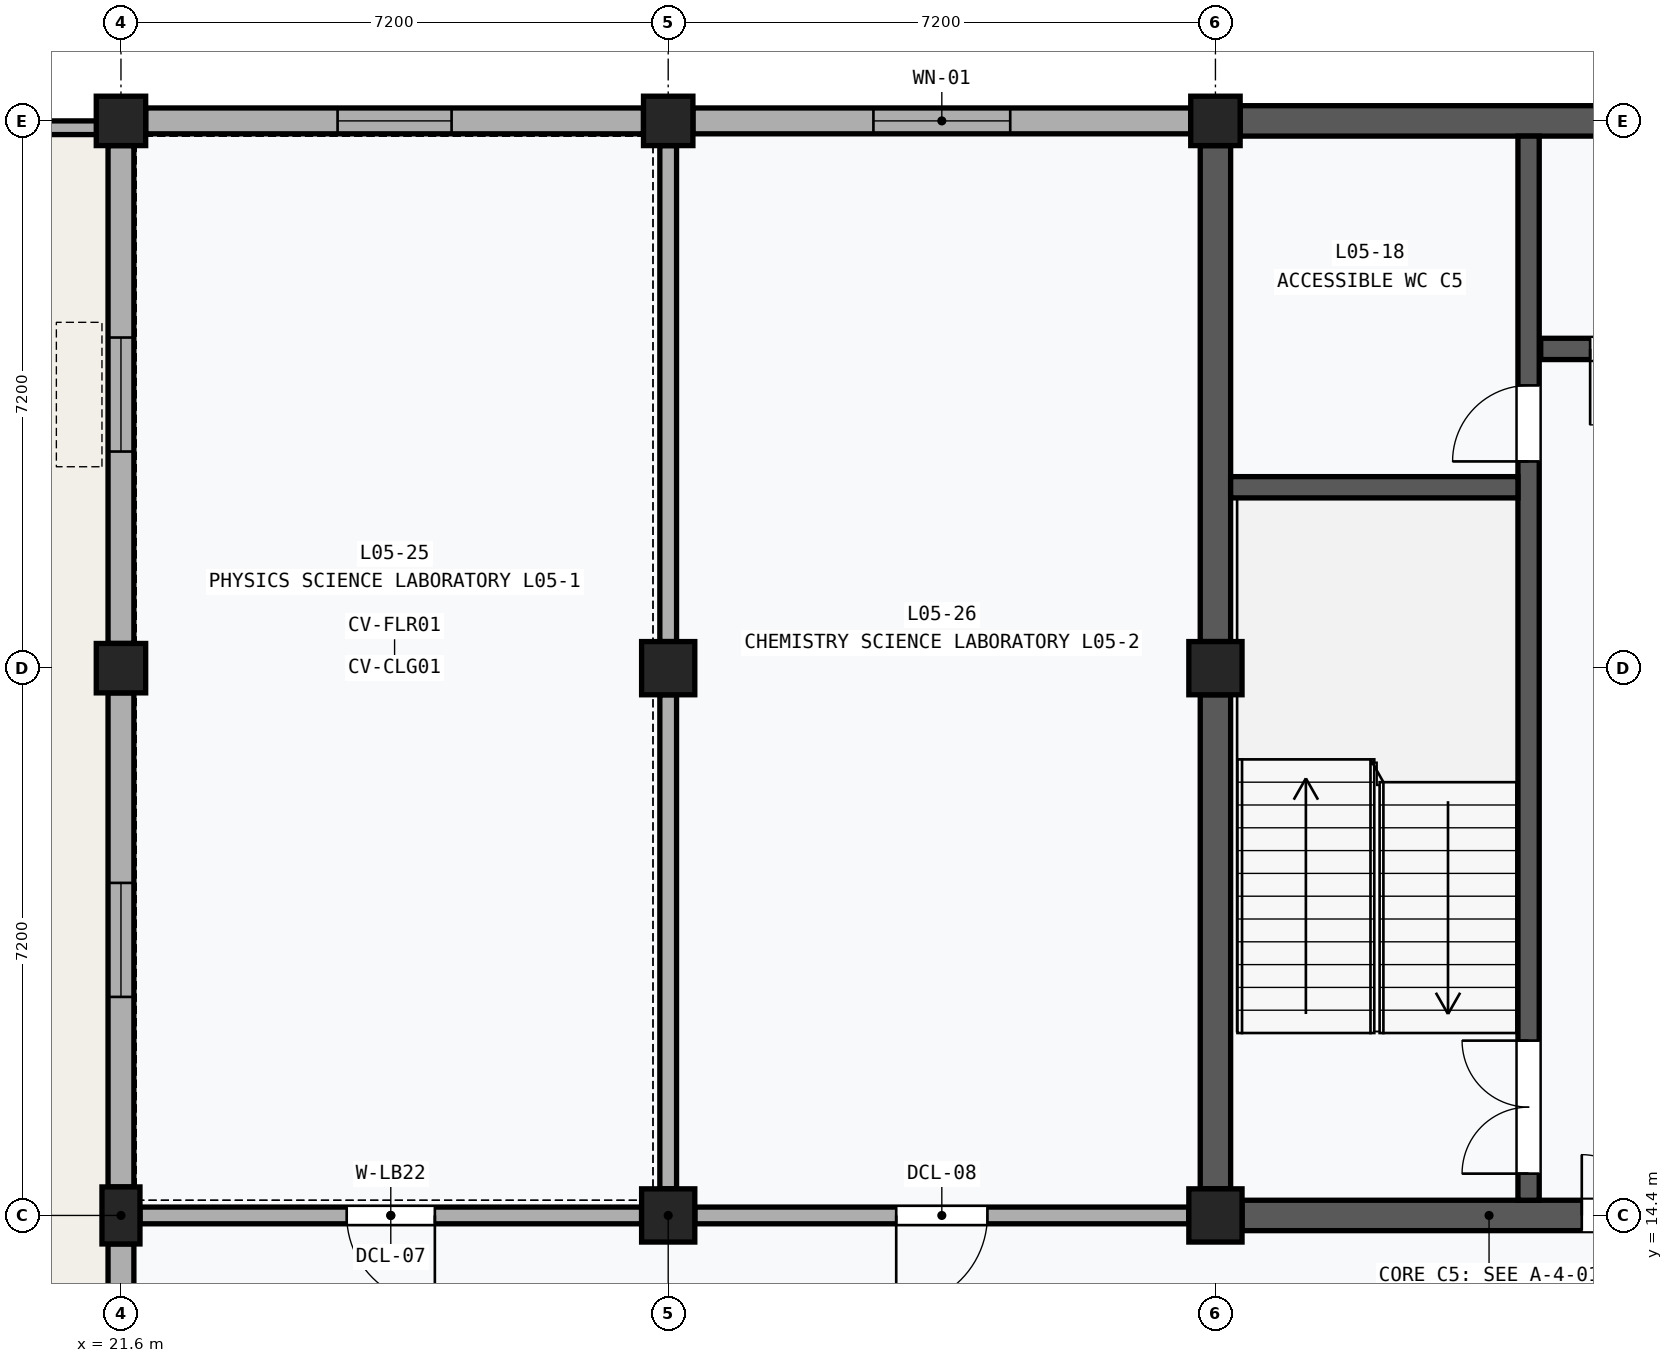
"""IFC4 building model, lengths in metres.
Left out: names, types, materials, properties, quantities, classifications, styles, units other than length and angle.
Written with IfcOpenShell. Run it as: python <this file> out.ifc"""

import sys

from ifc_helpers import new_model, si_unit, direction, frame, frame_2d, origin, origin_2d, place, context, subcontext, project, spatial, rectangle, extrude, element, fill, save


model = new_model("IFC4")
c1 = context("Model", 3, precision=1e-05, world=origin(), true_north=direction((0.0, 1.0)))
c2 = subcontext(c1, "Body", "Model", "MODEL_VIEW")
j1 = project(units=[si_unit("LENGTHUNIT", "METRE"), si_unit("PLANEANGLEUNIT", "RADIAN")], contexts=[c1])
p1 = place(None, origin())
s1 = spatial("IfcSite", under=j1, at=p1, CompositionType="ELEMENT")
p2 = place(p1, origin())
s2 = spatial("IfcBuilding", under=s1, at=p2, CompositionType="ELEMENT")
p3 = place(p2, frame((0.0, 0.0, 22.6)))
s3 = spatial("IfcBuildingStorey", under=s2, at=p3, CompositionType="ELEMENT", Elevation=22.6)
p4 = place(p3, frame((21.6, 14.4, 0.0), z_axis=(0.0, 0.0, 1.0), x_axis=(1.0, 0.0, 0.0)))
e1 = element("IfcColumn", 1, at=p4, inside=s3, PredefinedType="PILASTER", context=c2, shape_type="SweptSolid", body=[
    extrude(rectangle(XDim=0.5, YDim=0.75, at=origin_2d()), origin(), (0.0, 0.0, 1.0), 4.0),
])
for number, where, z_axis, x_axis in (
    (2, (21.6, 21.6, 0.0), (0.0, 0.0, 1.0), (1.0, 0.0, 0.0)),
    (3, (21.6, 28.8, 0.0), (0.0, 0.0, 1.0), (1.0, 0.0, 0.0)),
):
    element("IfcColumn", number, at=place(p3, frame(where, z_axis=z_axis, x_axis=x_axis)), inside=s3, PredefinedType="COLUMN", context=c2, shape_type="SweptSolid", body=[
        extrude(rectangle(XDim=0.65, YDim=0.65, at=origin_2d()), origin(), (0.0, 0.0, 1.0), 4.0),
    ])
for number, where, z_axis, x_axis in (
    (4, (28.8, 14.4, 0.0), (0.0, 0.0, 1.0), (1.0, 0.0, 0.0)),
    (5, (28.8, 21.6, 0.0), (0.0, 0.0, 1.0), (1.0, 0.0, 0.0)),
):
    element("IfcColumn", number, at=place(p3, frame(where, z_axis=z_axis, x_axis=x_axis)), inside=s3, PredefinedType="COLUMN", context=c2, shape_type="SweptSolid", body=[
        extrude(rectangle(XDim=0.7, YDim=0.7, at=origin_2d()), origin(), (0.0, 0.0, 1.0), 4.0),
    ])
p5 = place(p3, frame((28.8, 28.8, 0.0), z_axis=(0.0, 0.0, 1.0), x_axis=(1.0, 0.0, 0.0)))
e6 = element("IfcColumn", 6, at=p5, inside=s3, PredefinedType="COLUMN", context=c2, shape_type="SweptSolid", body=[
    extrude(rectangle(XDim=0.65, YDim=0.65, at=origin_2d()), origin(), (0.0, 0.0, 1.0), 4.0),
])
for number, where, z_axis, x_axis in (
    (7, (36.0, 14.4, 0.0), (0.0, 0.0, 1.0), (1.0, 0.0, 0.0)),
    (8, (36.0, 21.6, 0.0), (0.0, 0.0, 1.0), (1.0, 0.0, 0.0)),
):
    element("IfcColumn", number, at=place(p3, frame(where, z_axis=z_axis, x_axis=x_axis)), inside=s3, PredefinedType="COLUMN", context=c2, shape_type="SweptSolid", body=[
        extrude(rectangle(XDim=0.7, YDim=0.7, at=origin_2d()), origin(), (0.0, 0.0, 1.0), 4.0),
    ])
p6 = place(p3, frame((36.0, 28.8, 0.0), z_axis=(0.0, 0.0, 1.0), x_axis=(1.0, 0.0, 0.0)))
e9 = element("IfcColumn", 9, at=p6, inside=s3, PredefinedType="COLUMN", context=c2, shape_type="SweptSolid", body=[
    extrude(rectangle(XDim=0.65, YDim=0.65, at=origin_2d()), origin(), (0.0, 0.0, 1.0), 4.0),
])
p7 = place(p3, frame((21.6, 7.525, 0.0), z_axis=(0.0, 0.0, 1.0), x_axis=(0.0, 1.0, 0.0)))
e10 = element("IfcWall", 10, at=p7, inside=s3, PredefinedType="SOLIDWALL", context=c2, shape_type="SweptSolid", body=[
    extrude(rectangle(XDim=6.5, YDim=0.34, at=frame_2d((3.25, 0.0))), origin(), (0.0, 0.0, 1.0), 3.12),
])
p8 = place(p7, frame((2.5, 0.0, 1.1)))
e11 = element("IfcOpeningElement", 11, at=p8, cuts=e10, PredefinedType="OPENING", context=c2, shape_type="SweptSolid", body=[
    extrude(rectangle(XDim=1.5, YDim=1.35, at=frame_2d((0.75, 0.675))), frame((0.0, 0.182, 0.0), z_axis=(0.0, -1.0, 0.0), x_axis=(1.0, 0.0, 0.0)), (0.0, 0.0, 1.0), 0.364),
])
p9 = place(p3, frame((21.6, 14.775, 0.0), z_axis=(0.0, 0.0, 1.0), x_axis=(0.0, 1.0, 0.0)))
e12 = element("IfcWall", 12, at=p9, inside=s3, PredefinedType="SOLIDWALL", context=c2, shape_type="SweptSolid", body=[
    extrude(rectangle(XDim=6.5, YDim=0.34, at=frame_2d((3.25, 0.0))), origin(), (0.0, 0.0, 1.0), 3.12),
])
p10 = place(p9, frame((2.5, 0.0, 1.1)))
e13 = element("IfcOpeningElement", 13, at=p10, cuts=e12, PredefinedType="OPENING", context=c2, shape_type="SweptSolid", body=[
    extrude(rectangle(XDim=1.5, YDim=1.35, at=frame_2d((0.75, 0.675))), frame((0.0, 0.182, 0.0), z_axis=(0.0, -1.0, 0.0), x_axis=(1.0, 0.0, 0.0)), (0.0, 0.0, 1.0), 0.364),
])
p11 = place(p3, frame((21.925, 28.8, 0.0), z_axis=(0.0, 0.0, 1.0), x_axis=(1.0, 0.0, 0.0)))
e14 = element("IfcWall", 14, at=p11, inside=s3, PredefinedType="SOLIDWALL", context=c2, shape_type="SweptSolid", body=[
    extrude(rectangle(XDim=6.55, YDim=0.34, at=frame_2d((3.275, 0.0))), origin(), (0.0, 0.0, 1.0), 3.12),
])
p12 = place(p11, frame((2.525, 0.0, 1.1)))
e15 = element("IfcOpeningElement", 15, at=p12, cuts=e14, PredefinedType="OPENING", context=c2, shape_type="SweptSolid", body=[
    extrude(rectangle(XDim=1.5, YDim=1.35, at=frame_2d((0.75, 0.675))), frame((0.0, 0.182, 0.0), z_axis=(0.0, -1.0, 0.0), x_axis=(1.0, 0.0, 0.0)), (0.0, 0.0, 1.0), 0.364),
])
p13 = place(p3, frame((21.6, 21.925, 0.0), z_axis=(0.0, 0.0, 1.0), x_axis=(0.0, 1.0, 0.0)))
e16 = element("IfcWall", 16, at=p13, inside=s3, PredefinedType="SOLIDWALL", context=c2, shape_type="SweptSolid", body=[
    extrude(rectangle(XDim=6.55, YDim=0.34, at=frame_2d((3.275, 0.0))), origin(), (0.0, 0.0, 1.0), 3.12),
])
p14 = place(p13, frame((2.525, 0.0, 1.1)))
e17 = element("IfcOpeningElement", 17, at=p14, cuts=e16, PredefinedType="OPENING", context=c2, shape_type="SweptSolid", body=[
    extrude(rectangle(XDim=1.5, YDim=1.35, at=frame_2d((0.75, 0.675))), frame((0.0, 0.182, 0.0), z_axis=(0.0, -1.0, 0.0), x_axis=(1.0, 0.0, 0.0)), (0.0, 0.0, 1.0), 0.364),
])
p15 = place(p3, frame((29.125, 28.8, 0.0), z_axis=(0.0, 0.0, 1.0), x_axis=(1.0, 0.0, 0.0)))
e18 = element("IfcWall", 18, at=p15, inside=s3, PredefinedType="SOLIDWALL", context=c2, shape_type="SweptSolid", body=[
    extrude(rectangle(XDim=6.55, YDim=0.34, at=frame_2d((3.275, 0.0))), origin(), (0.0, 0.0, 1.0), 3.12),
])
p16 = place(p15, frame((2.375, 0.0, 0.9)))
e19 = element("IfcOpeningElement", 19, at=p16, cuts=e18, PredefinedType="OPENING", context=c2, shape_type="SweptSolid", body=[
    extrude(rectangle(XDim=1.8, YDim=1.8, at=frame_2d((0.9, 0.9))), frame((0.0, 0.182, 0.0), z_axis=(0.0, -1.0, 0.0), x_axis=(1.0, 0.0, 0.0)), (0.0, 0.0, 1.0), 0.364),
])
p17 = place(p3, frame((14.49, 28.71, 0.0), z_axis=(0.0, 0.0, 1.0), x_axis=(1.0, 0.0, 0.0)))
e20 = element("IfcWall", 20, at=p17, inside=s3, PredefinedType="PARAPET", context=c2, shape_type="SweptSolid", body=[
    extrude(rectangle(XDim=7.02, YDim=0.18, at=frame_2d((3.51, 0.0))), origin(), (0.0, 0.0, 1.0), 0.95),
])
p18 = place(p3, frame((36.0, 14.75, 0.0), z_axis=(0.0, 0.0, 1.0), x_axis=(0.0, 1.0, 0.0)))
e21 = element("IfcWall", 21, at=p18, inside=s3, PredefinedType="SHEAR", context=c2, shape_type="SweptSolid", body=[
    extrude(rectangle(XDim=6.5, YDim=0.4, at=frame_2d((3.25, 0.0))), origin(), (0.0, 0.0, 1.0), 2.98),
])
p19 = place(p3, frame((36.0, 21.95, 0.0), z_axis=(0.0, 0.0, 1.0), x_axis=(0.0, 1.0, 0.0)))
e22 = element("IfcWall", 22, at=p19, inside=s3, PredefinedType="SHEAR", context=c2, shape_type="SweptSolid", body=[
    extrude(rectangle(XDim=6.525, YDim=0.4, at=frame_2d((3.263, 0.0))), origin(), (0.0, 0.0, 1.0), 2.98),
])
p20 = place(p3, frame((36.35, 14.4, 0.0), z_axis=(0.0, 0.0, 1.0), x_axis=(1.0, 0.0, 0.0)))
e23 = element("IfcWall", 23, at=p20, inside=s3, PredefinedType="SHEAR", context=c2, shape_type="SweptSolid", body=[
    extrude(rectangle(XDim=6.5, YDim=0.4, at=frame_2d((3.25, 0.0))), origin(), (0.0, 0.0, 1.0), 2.98),
])
p21 = place(p20, frame((4.47, 0.0, 0.0)))
e24 = element("IfcOpeningElement", 24, at=p21, cuts=e23, PredefinedType="OPENING", context=c2, shape_type="SweptSolid", body=[
    extrude(rectangle(XDim=1.6, YDim=2.2, at=frame_2d((0.8, 1.1))), frame((0.0, 0.212, 0.0), z_axis=(0.0, -1.0, 0.0), x_axis=(1.0, 0.0, 0.0)), (0.0, 0.0, 1.0), 0.424),
])
p22 = place(p3, frame((36.325, 28.8, 0.0), z_axis=(0.0, 0.0, 1.0), x_axis=(1.0, 0.0, 0.0)))
e25 = element("IfcWall", 25, at=p22, inside=s3, PredefinedType="SHEAR", context=c2, shape_type="SweptSolid", body=[
    extrude(rectangle(XDim=6.625, YDim=0.4, at=frame_2d((3.312, 0.0))), origin(), (0.0, 0.0, 1.0), 3.12),
])
p23 = place(p3, frame((40.12, 14.6, 0.0), z_axis=(0.0, 0.0, 1.0), x_axis=(0.0, 1.0, 0.0)))
e26 = element("IfcWall", 26, at=p23, inside=s3, PredefinedType="SHEAR", context=c2, shape_type="SweptSolid", body=[
    extrude(rectangle(XDim=14.0, YDim=0.28, at=frame_2d((7.0, 0.0))), origin(), (0.0, 0.0, 1.0), 3.75),
])
p24 = place(p23, frame((0.35, 0.0, 0.0)))
e27 = element("IfcOpeningElement", 27, at=p24, cuts=e26, PredefinedType="OPENING", context=c2, shape_type="SweptSolid", body=[
    extrude(rectangle(XDim=1.75, YDim=2.15, at=frame_2d((0.875, 1.075))), frame((0.0, 0.152, 0.0), z_axis=(0.0, -1.0, 0.0), x_axis=(1.0, 0.0, 0.0)), (0.0, 0.0, 1.0), 0.304),
])
p25 = place(p23, frame((9.72, 0.0, 0.0)))
e28 = element("IfcOpeningElement", 28, at=p25, cuts=e26, PredefinedType="OPENING", context=c2, shape_type="SweptSolid", body=[
    extrude(rectangle(XDim=1.0, YDim=2.15, at=frame_2d((0.5, 1.075))), frame((0.0, 0.152, 0.0), z_axis=(0.0, -1.0, 0.0), x_axis=(1.0, 0.0, 0.0)), (0.0, 0.0, 1.0), 0.304),
])
p26 = place(p3, frame((36.2, 23.98, 0.0), z_axis=(0.0, 0.0, 1.0), x_axis=(1.0, 0.0, 0.0)))
e29 = element("IfcWall", 29, at=p26, inside=s3, PredefinedType="SHEAR", context=c2, shape_type="SweptSolid", body=[
    extrude(rectangle(XDim=3.78, YDim=0.28, at=frame_2d((1.89, 0.0))), origin(), (0.0, 0.0, 1.0), 3.75),
])
p27 = place(p3, frame((40.28, 25.8, 0.0), z_axis=(0.0, 0.0, 1.0), x_axis=(1.0, 0.0, 0.0)))
e30 = element("IfcWall", 30, at=p27, inside=s3, PredefinedType="SHEAR", context=c2, shape_type="SweptSolid", body=[
    extrude(rectangle(XDim=2.68, YDim=0.28, at=frame_2d((1.34, 0.0))), origin(), (0.0, 0.0, 1.0), 3.75),
])
p28 = place(p27, frame((0.65, 0.0, 0.0)))
e31 = element("IfcOpeningElement", 31, at=p28, cuts=e30, PredefinedType="OPENING", context=c2, shape_type="SweptSolid", body=[
    extrude(rectangle(XDim=1.0, YDim=2.15, at=frame_2d((0.5, 1.075))), frame((0.0, 0.152, 0.0), z_axis=(0.0, -1.0, 0.0), x_axis=(1.0, 0.0, 0.0)), (0.0, 0.0, 1.0), 0.304),
])
p29 = place(p3, frame((21.85, 14.4, 0.0), z_axis=(0.0, 0.0, 1.0), x_axis=(1.0, 0.0, 0.0)))
e32 = element("IfcWall", 32, at=p29, inside=s3, PredefinedType="PARTITIONING", context=c2, shape_type="SweptSolid", body=[
    extrude(rectangle(XDim=6.6, YDim=0.22, at=frame_2d((3.3, 0.0))), origin(), (0.0, 0.0, 1.0), 2.98),
])
p30 = place(p29, frame((2.72, 0.0, 0.0)))
e33 = element("IfcOpeningElement", 33, at=p30, cuts=e32, PredefinedType="OPENING", context=c2, shape_type="SweptSolid", body=[
    extrude(rectangle(XDim=1.16, YDim=2.22, at=frame_2d((0.58, 1.11))), frame((0.0, 0.122, 0.0), z_axis=(0.0, -1.0, 0.0), x_axis=(1.0, 0.0, 0.0)), (0.0, 0.0, 1.0), 0.244),
])
p31 = place(p3, frame((28.8, 14.75, 0.0), z_axis=(0.0, 0.0, 1.0), x_axis=(0.0, 1.0, 0.0)))
e34 = element("IfcWall", 34, at=p31, inside=s3, PredefinedType="PARTITIONING", context=c2, shape_type="SweptSolid", body=[
    extrude(rectangle(XDim=6.5, YDim=0.22, at=frame_2d((3.25, 0.0))), origin(), (0.0, 0.0, 1.0), 2.98),
])
p32 = place(p3, frame((28.8, 21.95, 0.0), z_axis=(0.0, 0.0, 1.0), x_axis=(0.0, 1.0, 0.0)))
e35 = element("IfcWall", 35, at=p32, inside=s3, PredefinedType="PARTITIONING", context=c2, shape_type="SweptSolid", body=[
    extrude(rectangle(XDim=6.525, YDim=0.22, at=frame_2d((3.263, 0.0))), origin(), (0.0, 0.0, 1.0), 2.98),
])
p33 = place(p3, frame((29.15, 14.4, 0.0), z_axis=(0.0, 0.0, 1.0), x_axis=(1.0, 0.0, 0.0)))
e36 = element("IfcWall", 36, at=p33, inside=s3, PredefinedType="PARTITIONING", context=c2, shape_type="SweptSolid", body=[
    extrude(rectangle(XDim=6.5, YDim=0.22, at=frame_2d((3.25, 0.0))), origin(), (0.0, 0.0, 1.0), 2.98),
])
p34 = place(p33, frame((2.65, 0.0, 0.0)))
e37 = element("IfcOpeningElement", 37, at=p34, cuts=e36, PredefinedType="OPENING", context=c2, shape_type="SweptSolid", body=[
    extrude(rectangle(XDim=1.2, YDim=2.24, at=frame_2d((0.6, 1.12))), frame((0.0, 0.122, 0.0), z_axis=(0.0, -1.0, 0.0), x_axis=(1.0, 0.0, 0.0)), (0.0, 0.0, 1.0), 0.244),
])
p35 = place(p10, origin())
e38 = element("IfcWindow", 38, at=p35, inside=s3, PartitioningType="SINGLE_PANEL", PredefinedType="WINDOW", context=c2, shape_type="SweptSolid", body=[
    extrude(rectangle(XDim=1.5, YDim=1.35, at=frame_2d((0.75, 0.675))), frame((0.0, 0.03, 0.0), z_axis=(0.0, -1.0, 0.0), x_axis=(1.0, 0.0, 0.0)), (0.0, 0.0, 1.0), 0.06),
])
fill(e13, e38)
p36 = place(p12, origin())
e39 = element("IfcWindow", 39, at=p36, inside=s3, PartitioningType="SINGLE_PANEL", PredefinedType="WINDOW", context=c2, shape_type="SweptSolid", body=[
    extrude(rectangle(XDim=1.5, YDim=1.35, at=frame_2d((0.75, 0.675))), frame((0.0, 0.03, 0.0), z_axis=(0.0, -1.0, 0.0), x_axis=(1.0, 0.0, 0.0)), (0.0, 0.0, 1.0), 0.06),
])
fill(e15, e39)
p37 = place(p14, origin())
e40 = element("IfcWindow", 40, at=p37, inside=s3, PartitioningType="SINGLE_PANEL", PredefinedType="WINDOW", context=c2, shape_type="SweptSolid", body=[
    extrude(rectangle(XDim=1.5, YDim=1.35, at=frame_2d((0.75, 0.675))), frame((0.0, 0.03, 0.0), z_axis=(0.0, -1.0, 0.0), x_axis=(1.0, 0.0, 0.0)), (0.0, 0.0, 1.0), 0.06),
])
fill(e17, e40)
p38 = place(p16, origin())
e41 = element("IfcWindow", 41, at=p38, inside=s3, PartitioningType="SINGLE_PANEL", PredefinedType="WINDOW", context=c2, shape_type="SweptSolid", body=[
    extrude(rectangle(XDim=1.8, YDim=1.8, at=frame_2d((0.9, 0.9))), frame((0.0, 0.03, 0.0), z_axis=(0.0, -1.0, 0.0), x_axis=(1.0, 0.0, 0.0)), (0.0, 0.0, 1.0), 0.06),
])
fill(e19, e41)
p39 = place(p21, origin())
e42 = element("IfcDoor", 42, at=p39, inside=s3, OperationType="DOUBLE_DOOR_SINGLE_SWING", PredefinedType="DOOR", context=c2, shape_type="SweptSolid", body=[
    extrude(rectangle(XDim=1.6, YDim=2.2, at=frame_2d((0.8, 1.1))), frame((0.0, 0.025, 0.0), z_axis=(0.0, -1.0, 0.0), x_axis=(1.0, 0.0, 0.0)), (0.0, 0.0, 1.0), 0.05),
])
fill(e24, e42)
p40 = place(p24, origin())
e43 = element("IfcDoor", 43, at=p40, inside=s3, OperationType="DOUBLE_DOOR_SINGLE_SWING", PredefinedType="DOOR", context=c2, shape_type="SweptSolid", body=[
    extrude(rectangle(XDim=1.75, YDim=2.15, at=frame_2d((0.875, 1.075))), frame((0.0, 0.025, 0.0), z_axis=(0.0, -1.0, 0.0), x_axis=(1.0, 0.0, 0.0)), (0.0, 0.0, 1.0), 0.05),
])
fill(e27, e43)
p41 = place(p25, origin())
e44 = element("IfcDoor", 44, at=p41, inside=s3, OperationType="SINGLE_SWING_LEFT", PredefinedType="DOOR", context=c2, shape_type="SweptSolid", body=[
    extrude(rectangle(XDim=1.0, YDim=2.15, at=frame_2d((0.5, 1.075))), frame((0.0, 0.025, 0.0), z_axis=(0.0, -1.0, 0.0), x_axis=(1.0, 0.0, 0.0)), (0.0, 0.0, 1.0), 0.05),
])
fill(e28, e44)
p42 = place(p28, frame((1.0, 0.0, 0.0), z_axis=(0.0, 0.0, 1.0), x_axis=(-1.0, 0.0, 0.0)))
e45 = element("IfcDoor", 45, at=p42, inside=s3, OperationType="SINGLE_SWING_RIGHT", PredefinedType="DOOR", context=c2, shape_type="SweptSolid", body=[
    extrude(rectangle(XDim=1.0, YDim=2.15, at=frame_2d((0.5, 1.075))), frame((0.0, 0.025, 0.0), z_axis=(0.0, -1.0, 0.0), x_axis=(1.0, 0.0, 0.0)), (0.0, 0.0, 1.0), 0.05),
])
fill(e31, e45)
p43 = place(p30, frame((1.16, 0.0, 0.0), z_axis=(0.0, 0.0, 1.0), x_axis=(-1.0, 0.0, 0.0)))
e46 = element("IfcDoor", 46, at=p43, inside=s3, OperationType="SINGLE_SWING_LEFT", PredefinedType="DOOR", context=c2, shape_type="SweptSolid", body=[
    extrude(rectangle(XDim=1.16, YDim=2.22, at=frame_2d((0.58, 1.11))), frame((0.0, 0.025, 0.0), z_axis=(0.0, -1.0, 0.0), x_axis=(1.0, 0.0, 0.0)), (0.0, 0.0, 1.0), 0.05),
])
fill(e33, e46)
p44 = place(p34, frame((1.2, 0.0, 0.0), z_axis=(0.0, 0.0, 1.0), x_axis=(-1.0, 0.0, 0.0)))
e47 = element("IfcDoor", 47, at=p44, inside=s3, OperationType="SINGLE_SWING_RIGHT", PredefinedType="DOOR", context=c2, shape_type="SweptSolid", body=[
    extrude(rectangle(XDim=1.2, YDim=2.24, at=frame_2d((0.6, 1.12))), frame((0.0, 0.025, 0.0), z_axis=(0.0, -1.0, 0.0), x_axis=(1.0, 0.0, 0.0)), (0.0, 0.0, 1.0), 0.05),
])
fill(e37, e47)
save(model, sys.argv[1])
